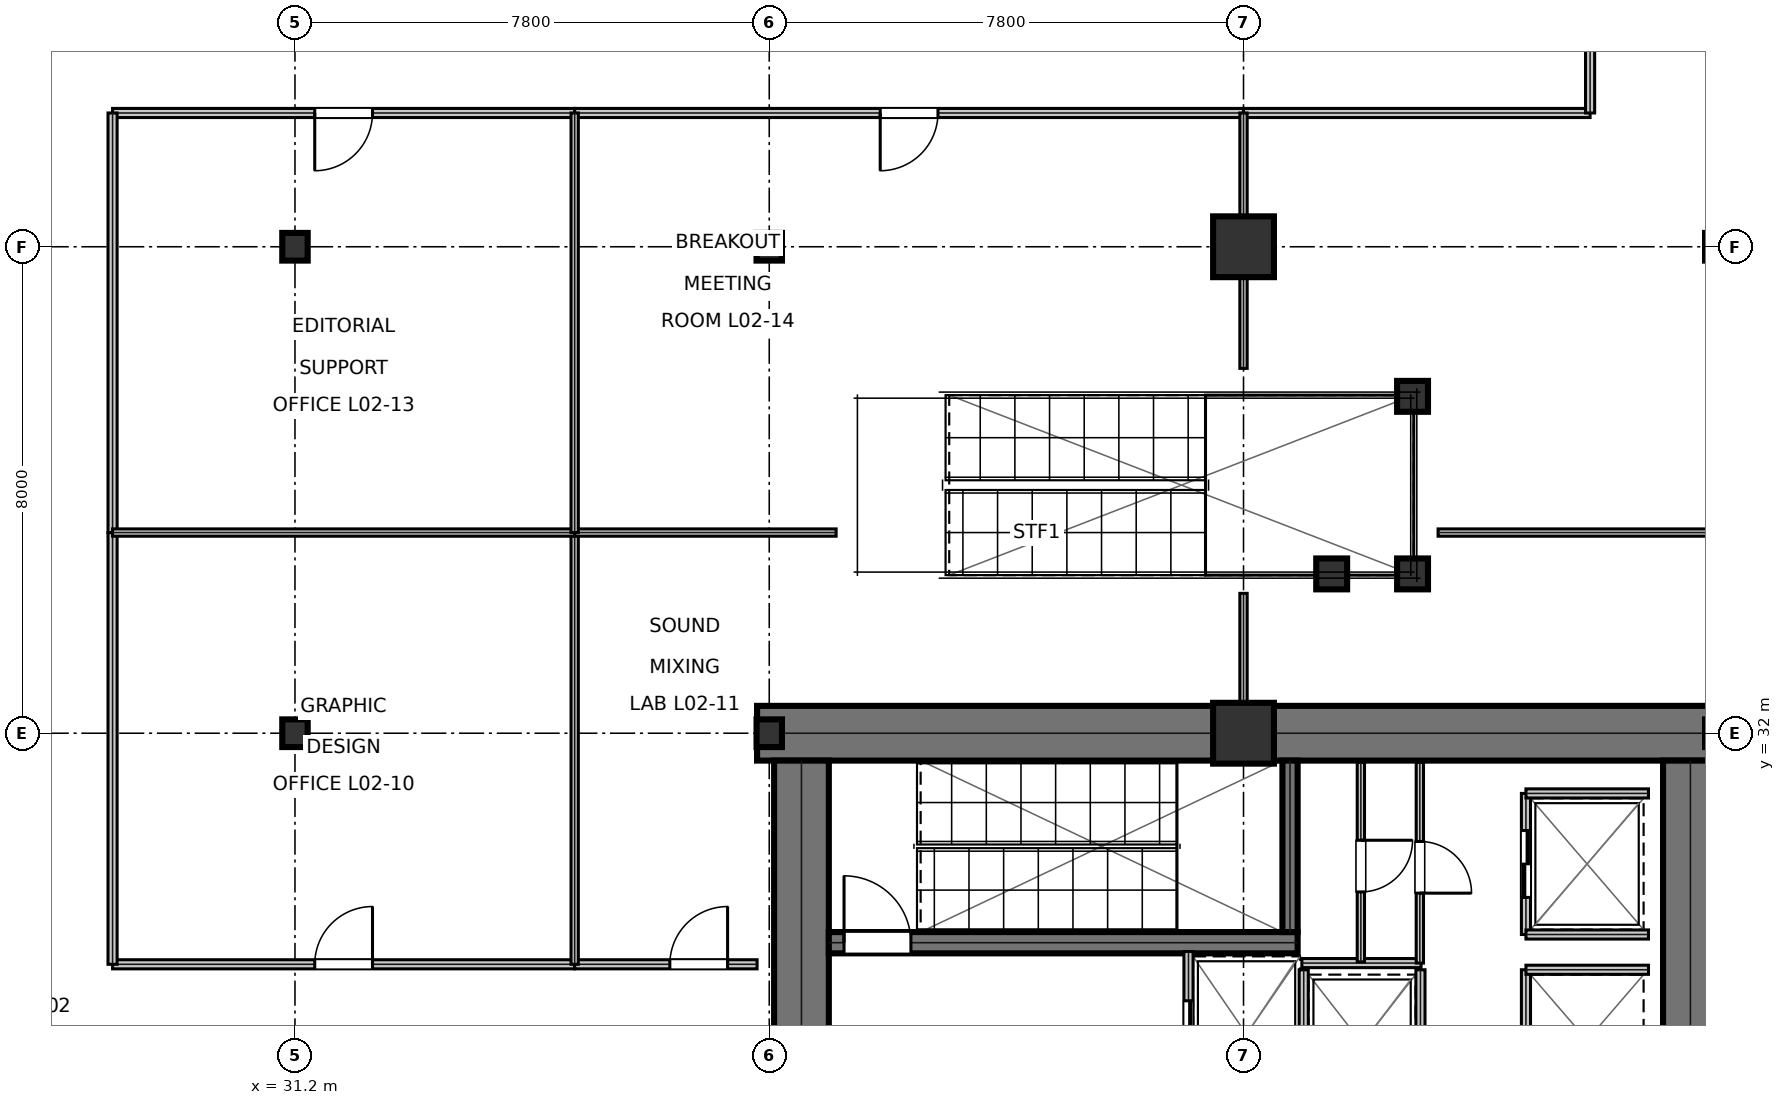
"""IFC4 building model, lengths in metres.
Left out: names, types, materials, properties, quantities, classifications, styles, units other than length and angle.
Written with IfcOpenShell. Run it as: python <this file> out.ifc"""

import sys

from ifc_helpers import new_model, si_unit, direction, frame, frame_2d, origin, origin_2d, place, context, subcontext, project, spatial, rectangle, hollow_circle, i_section, extrude, element, fill, save


model = new_model("IFC4")
c1 = context("Model", 3, precision=1e-05, world=origin(), true_north=direction((0.0, 1.0)))
c2 = subcontext(c1, "Body", "Model", "MODEL_VIEW")
j1 = project(units=[si_unit("LENGTHUNIT", "METRE"), si_unit("PLANEANGLEUNIT", "RADIAN")], contexts=[c1])
p1 = place(None, origin())
s1 = spatial("IfcSite", under=j1, at=p1, CompositionType="ELEMENT")
p2 = place(p1, origin())
s2 = spatial("IfcBuilding", under=s1, at=p2, CompositionType="ELEMENT")
p3 = place(p2, frame((0.0, 0.0, 10.8)))
s3 = spatial("IfcBuildingStorey", under=s2, at=p3, CompositionType="ELEMENT", Elevation=10.8)
p4 = place(p3, frame((38.8, 32.0, 0.0), z_axis=(0.0, 0.0, 1.0), x_axis=(1.0, 0.0, 0.0)))
e1 = element("IfcWall", 1, at=p4, inside=s3, PredefinedType="SHEAR", context=c2, shape_type="SweptSolid", body=[
    extrude(rectangle(XDim=16.0, YDim=0.9, at=frame_2d((8.0, 0.0))), origin(), (0.0, 0.0, 1.0), 5.12),
])
p5 = place(p3, frame((39.53, 25.4, 0.0), z_axis=(0.0, 0.0, 1.0), x_axis=(0.0, 1.0, 0.0)))
e2 = element("IfcWall", 2, at=p5, inside=s3, PredefinedType="SHEAR", context=c2, shape_type="SweptSolid", body=[
    extrude(rectangle(XDim=6.15, YDim=0.9, at=frame_2d((3.075, 0.0))), origin(), (0.0, 0.0, 1.0), 5.12),
])
p6 = place(p3, frame((54.15, 16.45, 0.0), z_axis=(0.0, 0.0, 1.0), x_axis=(0.0, 1.0, 0.0)))
e3 = element("IfcWall", 3, at=p6, inside=s3, PredefinedType="SHEAR", context=c2, shape_type="SweptSolid", body=[
    extrude(rectangle(XDim=15.1, YDim=0.9, at=frame_2d((7.55, 0.0))), origin(), (0.0, 0.0, 1.0), 5.12),
])
p7 = place(p3, frame((39.98, 28.555, 0.0), z_axis=(0.0, 0.0, 1.0), x_axis=(1.0, 0.0, 0.0)))
e4 = element("IfcWall", 4, at=p7, inside=s3, PredefinedType="SHEAR", context=c2, shape_type="SweptSolid", body=[
    extrude(rectangle(XDim=7.71, YDim=0.35, at=frame_2d((3.855, 0.0))), origin(), (0.0, 0.0, 1.0), 5.12),
])
p8 = place(p7, frame((0.25, 0.0, 0.0)))
e5 = element("IfcOpeningElement", 5, at=p8, cuts=e4, PredefinedType="OPENING", context=c2, shape_type="SweptSolid", body=[
    extrude(rectangle(XDim=1.1, YDim=2.15, at=frame_2d((0.55, 1.075))), frame((0.0, 0.185, 0.0), z_axis=(0.0, -1.0, 0.0), x_axis=(1.0, 0.0, 0.0)), (0.0, 0.0, 1.0), 0.37),
])
p9 = place(p3, frame((47.565, 28.73, 0.0), z_axis=(0.0, 0.0, 1.0), x_axis=(0.0, 1.0, 0.0)))
e6 = element("IfcWall", 6, at=p9, inside=s3, PredefinedType="SHEAR", context=c2, shape_type="SweptSolid", body=[
    extrude(rectangle(XDim=2.82, YDim=0.25, at=frame_2d((1.41, 0.0))), origin(), (0.0, 0.0, 1.0), 5.12),
])
for number, where, z_axis, x_axis in (
    (7, (31.2, 32.0, 0.0), (0.0, 0.0, 1.0), (1.0, 0.0, 0.0)),
    (8, (31.2, 40.0, 0.0), (0.0, 0.0, 1.0), (1.0, 0.0, 0.0)),
    (9, (39.0, 32.0, 0.0), (0.0, 0.0, 1.0), (1.0, 0.0, 0.0)),
    (10, (39.0, 40.0, 0.0), (0.0, 0.0, 1.0), (1.0, 0.0, 0.0)),
):
    element("IfcColumn", number, at=place(p3, frame(where, z_axis=z_axis, x_axis=x_axis)), inside=s3, PredefinedType="COLUMN", context=c2, shape_type="SweptSolid", body=[
        extrude(i_section(OverallWidth=0.418, OverallDepth=0.455, WebThickness=0.042, FlangeThickness=0.068, at=origin_2d()), origin(), (0.0, 0.0, 1.0), 5.395),
    ])
for number, where, z_axis, x_axis in (
    (11, (46.8, 32.0, 0.0), (0.0, 0.0, 1.0), (1.0, 0.0, 0.0)),
    (12, (46.8, 40.0, 0.0), (0.0, 0.0, 1.0), (1.0, 0.0, 0.0)),
):
    element("IfcColumn", number, at=place(p3, frame(where, z_axis=z_axis, x_axis=x_axis)), inside=s3, PredefinedType="COLUMN", context=c2, shape_type="SweptSolid", body=[
        extrude(rectangle(XDim=1.0, YDim=1.0, at=origin_2d()), origin(), (0.0, 0.0, 1.0), 5.395),
    ])
for number, where, z_axis, x_axis in (
    (13, (48.25, 34.62, 0.0), (0.0, 0.0, 1.0), (1.0, 0.0, 0.0)),
    (14, (49.58, 34.62, 0.0), (0.0, 0.0, 1.0), (1.0, 0.0, 0.0)),
    (15, (49.58, 37.54, 0.0), (0.0, 0.0, 1.0), (1.0, 0.0, 0.0)),
):
    element("IfcColumn", number, at=place(p3, frame(where, z_axis=z_axis, x_axis=x_axis)), inside=s3, PredefinedType="COLUMN", context=c2, shape_type="SweptSolid", body=[
        extrude(hollow_circle(Radius=0.254, WallThickness=0.02, at=origin_2d()), origin(), (0.0, 0.0, 1.0), 5.394),
    ])
p10 = place(p3, frame((45.895, 25.69, 0.0), z_axis=(0.0, 0.0, 1.0), x_axis=(0.0, 1.0, 0.0)))
e16 = element("IfcWall", 16, at=p10, inside=s3, PredefinedType="PARTITIONING", context=c2, shape_type="SweptSolid", body=[
    extrude(rectangle(XDim=2.72, YDim=0.15, at=frame_2d((1.36, 0.0))), origin(), (0.0, 0.0, 1.0), 5.12),
])
p11 = place(p10, frame((0.81, 0.0, 0.0)))
e17 = element("IfcOpeningElement", 17, at=p11, cuts=e16, PredefinedType="OPENING", context=c2, shape_type="SweptSolid", body=[
    extrude(rectangle(XDim=1.1, YDim=2.15, at=frame_2d((0.55, 1.075))), frame((0.0, 0.085, 0.0), z_axis=(0.0, -1.0, 0.0), x_axis=(1.0, 0.0, 0.0)), (0.0, 0.0, 1.0), 0.17),
])
for number, where, z_axis, x_axis in (
    (18, (47.79, 25.695, 0.0), (0.0, 0.0, 1.0), (0.0, 1.0, 0.0)),
    (19, (49.71, 25.695, 0.0), (0.0, 0.0, 1.0), (0.0, 1.0, 0.0)),
):
    element("IfcWall", number, at=place(p3, frame(where, z_axis=z_axis, x_axis=x_axis)), inside=s3, PredefinedType="PARTITIONING", context=c2, shape_type="SweptSolid", body=[
        extrude(rectangle(XDim=2.415, YDim=0.15, at=frame_2d((1.208, 0.0))), origin(), (0.0, 0.0, 1.0), 5.12),
    ])
p12 = place(p3, frame((51.445, 28.69, 0.0), z_axis=(0.0, 0.0, 1.0), x_axis=(0.0, 1.0, 0.0)))
e20 = element("IfcWall", 20, at=p12, inside=s3, PredefinedType="PARTITIONING", context=c2, shape_type="SweptSolid", body=[
    extrude(rectangle(XDim=2.32, YDim=0.15, at=frame_2d((1.16, 0.0))), origin(), (0.0, 0.0, 1.0), 5.12),
])
p13 = place(p12, frame((0.61, 0.0, 0.0)))
e21 = element("IfcOpeningElement", 21, at=p13, cuts=e20, PredefinedType="OPENING", context=c2, shape_type="SweptSolid", body=[
    extrude(rectangle(XDim=1.1, YDim=2.15, at=frame_2d((0.55, 1.075))), frame((0.0, 0.085, 0.0), z_axis=(0.0, -1.0, 0.0), x_axis=(1.0, 0.0, 0.0)), (0.0, 0.0, 1.0), 0.17),
])
for number, where, z_axis, x_axis in (
    (22, (51.445, 28.69, 0.0), (0.0, 0.0, 1.0), (1.0, 0.0, 0.0)),
    (23, (51.445, 31.01, 0.0), (0.0, 0.0, 1.0), (1.0, 0.0, 0.0)),
):
    element("IfcWall", number, at=place(p3, frame(where, z_axis=z_axis, x_axis=x_axis)), inside=s3, PredefinedType="PARTITIONING", context=c2, shape_type="SweptSolid", body=[
        extrude(rectangle(XDim=2.015, YDim=0.15, at=frame_2d((1.007, 0.0))), origin(), (0.0, 0.0, 1.0), 5.12),
    ])
p14 = place(p3, frame((51.445, 25.79, 0.0), z_axis=(0.0, 0.0, 1.0), x_axis=(0.0, 1.0, 0.0)))
e24 = element("IfcWall", 24, at=p14, inside=s3, PredefinedType="PARTITIONING", context=c2, shape_type="SweptSolid", body=[
    extrude(rectangle(XDim=2.32, YDim=0.15, at=frame_2d((1.16, 0.0))), origin(), (0.0, 0.0, 1.0), 5.12),
])
p15 = place(p3, frame((51.445, 28.11, 0.0), z_axis=(0.0, 0.0, 1.0), x_axis=(1.0, 0.0, 0.0)))
e25 = element("IfcWall", 25, at=p15, inside=s3, PredefinedType="PARTITIONING", context=c2, shape_type="SweptSolid", body=[
    extrude(rectangle(XDim=2.015, YDim=0.15, at=frame_2d((1.007, 0.0))), origin(), (0.0, 0.0, 1.0), 5.12),
])
p16 = place(p3, frame((47.76, 28.22, 0.0), z_axis=(0.0, 0.0, 1.0), x_axis=(1.0, 0.0, 0.0)))
e26 = element("IfcWall", 26, at=p16, inside=s3, PredefinedType="PARTITIONING", context=c2, shape_type="SweptSolid", body=[
    extrude(rectangle(XDim=1.96, YDim=0.15, at=frame_2d((0.98, 0.0))), origin(), (0.0, 0.0, 1.0), 5.12),
])
p17 = place(p3, frame((48.73, 28.24, 0.0), z_axis=(0.0, 0.0, 1.0), x_axis=(0.0, 1.0, 0.0)))
e27 = element("IfcWall", 27, at=p17, inside=s3, PredefinedType="PARTITIONING", context=c2, shape_type="SweptSolid", body=[
    extrude(rectangle(XDim=3.28, YDim=0.12, at=frame_2d((1.64, 0.0))), origin(), (0.0, 0.0, 1.0), 5.12),
])
p18 = place(p17, frame((1.15, 0.0, 0.0)))
e28 = element("IfcOpeningElement", 28, at=p18, cuts=e27, PredefinedType="OPENING", context=c2, shape_type="SweptSolid", body=[
    extrude(rectangle(XDim=0.85, YDim=2.15, at=frame_2d((0.425, 1.075))), frame((0.0, 0.07, 0.0), z_axis=(0.0, -1.0, 0.0), x_axis=(1.0, 0.0, 0.0)), (0.0, 0.0, 1.0), 0.14),
])
p19 = place(p3, frame((49.7, 28.22, 0.0), z_axis=(0.0, 0.0, 1.0), x_axis=(0.0, 1.0, 0.0)))
e29 = element("IfcWall", 29, at=p19, inside=s3, PredefinedType="PARTITIONING", context=c2, shape_type="SweptSolid", body=[
    extrude(rectangle(XDim=3.3, YDim=0.12, at=frame_2d((1.65, 0.0))), origin(), (0.0, 0.0, 1.0), 5.12),
])
p20 = place(p19, frame((1.15, 0.0, 0.0)))
e30 = element("IfcOpeningElement", 30, at=p20, cuts=e29, PredefinedType="OPENING", context=c2, shape_type="SweptSolid", body=[
    extrude(rectangle(XDim=0.85, YDim=2.15, at=frame_2d((0.425, 1.075))), frame((0.0, 0.07, 0.0), z_axis=(0.0, -1.0, 0.0), x_axis=(1.0, 0.0, 0.0)), (0.0, 0.0, 1.0), 0.14),
])
p21 = place(p3, frame((28.2, 28.2, 0.0), z_axis=(0.0, 0.0, 1.0), x_axis=(1.0, 0.0, 0.0)))
e31 = element("IfcWall", 31, at=p21, inside=s3, PredefinedType="PARTITIONING", context=c2, shape_type="SweptSolid", body=[
    extrude(rectangle(XDim=7.6, YDim=0.15, at=frame_2d((3.8, 0.0))), origin(), (0.0, 0.0, 1.0), 4.415),
])
p22 = place(p21, frame((3.325, 0.0, 0.0)))
e32 = element("IfcOpeningElement", 32, at=p22, cuts=e31, PredefinedType="OPENING", context=c2, shape_type="SweptSolid", body=[
    extrude(rectangle(XDim=0.95, YDim=2.15, at=frame_2d((0.475, 1.075))), frame((0.0, 0.085, 0.0), z_axis=(0.0, -1.0, 0.0), x_axis=(1.0, 0.0, 0.0)), (0.0, 0.0, 1.0), 0.17),
])
p23 = place(p3, frame((35.8, 28.2, 0.0), z_axis=(0.0, 0.0, 1.0), x_axis=(1.0, 0.0, 0.0)))
e33 = element("IfcWall", 33, at=p23, inside=s3, PredefinedType="PARTITIONING", context=c2, shape_type="SweptSolid", body=[
    extrude(rectangle(XDim=3.0, YDim=0.15, at=frame_2d((1.5, 0.0))), origin(), (0.0, 0.0, 1.0), 5.12),
])
p24 = place(p23, frame((1.565, 0.0, 0.0)))
e34 = element("IfcOpeningElement", 34, at=p24, cuts=e33, PredefinedType="OPENING", context=c2, shape_type="SweptSolid", body=[
    extrude(rectangle(XDim=0.95, YDim=2.15, at=frame_2d((0.475, 1.075))), frame((0.0, 0.085, 0.0), z_axis=(0.0, -1.0, 0.0), x_axis=(1.0, 0.0, 0.0)), (0.0, 0.0, 1.0), 0.17),
])
p25 = place(p3, frame((28.2, 42.2, 0.0), z_axis=(0.0, 0.0, 1.0), x_axis=(1.0, 0.0, 0.0)))
e35 = element("IfcWall", 35, at=p25, inside=s3, PredefinedType="PARTITIONING", context=c2, shape_type="SweptSolid", body=[
    extrude(rectangle(XDim=7.6, YDim=0.15, at=frame_2d((3.8, 0.0))), origin(), (0.0, 0.0, 1.0), 4.415),
])
p26 = place(p25, frame((3.325, 0.0, 0.0)))
e36 = element("IfcOpeningElement", 36, at=p26, cuts=e35, PredefinedType="OPENING", context=c2, shape_type="SweptSolid", body=[
    extrude(rectangle(XDim=0.95, YDim=2.15, at=frame_2d((0.475, 1.075))), frame((0.0, 0.085, 0.0), z_axis=(0.0, -1.0, 0.0), x_axis=(1.0, 0.0, 0.0)), (0.0, 0.0, 1.0), 0.17),
])
p27 = place(p3, frame((35.8, 42.2, 0.0), z_axis=(0.0, 0.0, 1.0), x_axis=(1.0, 0.0, 0.0)))
e37 = element("IfcWall", 37, at=p27, inside=s3, PredefinedType="PARTITIONING", context=c2, shape_type="SweptSolid", body=[
    extrude(rectangle(XDim=11.0, YDim=0.15, at=frame_2d((5.5, 0.0))), origin(), (0.0, 0.0, 1.0), 4.415),
])
p28 = place(p27, frame((5.025, 0.0, 0.0)))
e38 = element("IfcOpeningElement", 38, at=p28, cuts=e37, PredefinedType="OPENING", context=c2, shape_type="SweptSolid", body=[
    extrude(rectangle(XDim=0.95, YDim=2.15, at=frame_2d((0.475, 1.075))), frame((0.0, 0.085, 0.0), z_axis=(0.0, -1.0, 0.0), x_axis=(1.0, 0.0, 0.0)), (0.0, 0.0, 1.0), 0.17),
])
p29 = place(p3, frame((28.2, 28.2, 0.0), z_axis=(0.0, 0.0, 1.0), x_axis=(0.0, 1.0, 0.0)))
e39 = element("IfcWall", 39, at=p29, inside=s3, PredefinedType="PARTITIONING", context=c2, shape_type="SweptSolid", body=[
    extrude(rectangle(XDim=7.1, YDim=0.15, at=frame_2d((3.55, 0.0))), origin(), (0.0, 0.0, 1.0), 4.338),
])
p30 = place(p3, frame((28.2, 35.3, 0.0), z_axis=(0.0, 0.0, 1.0), x_axis=(0.0, 1.0, 0.0)))
e40 = element("IfcWall", 40, at=p30, inside=s3, PredefinedType="PARTITIONING", context=c2, shape_type="SweptSolid", body=[
    extrude(rectangle(XDim=6.9, YDim=0.15, at=frame_2d((3.45, 0.0))), origin(), (0.0, 0.0, 1.0), 4.338),
])
p31 = place(p3, frame((46.8, 42.2, 0.0), z_axis=(0.0, 0.0, 1.0), x_axis=(1.0, 0.0, 0.0)))
e41 = element("IfcWall", 41, at=p31, inside=s3, PredefinedType="PARTITIONING", context=c2, shape_type="SweptSolid", body=[
    extrude(rectangle(XDim=5.7, YDim=0.15, at=frame_2d((2.85, 0.0))), origin(), (0.0, 0.0, 1.0), 4.415),
])
p32 = place(p3, frame((52.5, 42.2, 0.0), z_axis=(0.0, 0.0, 1.0), x_axis=(0.0, 1.0, 0.0)))
e42 = element("IfcWall", 42, at=p32, inside=s3, PredefinedType="PARTITIONING", context=c2, shape_type="SweptSolid", body=[
    extrude(rectangle(XDim=2.0, YDim=0.15, at=frame_2d((1.0, 0.0))), origin(), (0.0, 0.0, 1.0), 4.701),
])
p33 = place(p3, frame((46.8, 32.4, 0.0), z_axis=(0.0, 0.0, 1.0), x_axis=(0.0, 1.0, 0.0)))
e43 = element("IfcWall", 43, at=p33, inside=s3, PredefinedType="PARTITIONING", context=c2, shape_type="SweptSolid", body=[
    extrude(rectangle(XDim=1.9, YDim=0.12, at=frame_2d((0.95, 0.0))), origin(), (0.0, 0.0, 1.0), 5.12),
])
p34 = place(p3, frame((50.0, 35.3, 0.0), z_axis=(0.0, 0.0, 1.0), x_axis=(1.0, 0.0, 0.0)))
e44 = element("IfcWall", 44, at=p34, inside=s3, PredefinedType="PARTITIONING", context=c2, shape_type="SweptSolid", body=[
    extrude(rectangle(XDim=12.4, YDim=0.12, at=frame_2d((6.2, 0.0))), origin(), (0.0, 0.0, 1.0), 4.415),
])
p35 = place(p3, frame((35.8, 28.2, 0.0), z_axis=(0.0, 0.0, 1.0), x_axis=(0.0, 1.0, 0.0)))
e45 = element("IfcWall", 45, at=p35, inside=s3, PredefinedType="PARTITIONING", context=c2, shape_type="SweptSolid", body=[
    extrude(rectangle(XDim=7.1, YDim=0.12, at=frame_2d((3.55, 0.0))), origin(), (0.0, 0.0, 1.0), 4.338),
])
p36 = place(p3, frame((28.2, 35.3, 0.0), z_axis=(0.0, 0.0, 1.0), x_axis=(1.0, 0.0, 0.0)))
e46 = element("IfcWall", 46, at=p36, inside=s3, PredefinedType="PARTITIONING", context=c2, shape_type="SweptSolid", body=[
    extrude(rectangle(XDim=7.6, YDim=0.12, at=frame_2d((3.8, 0.0))), origin(), (0.0, 0.0, 1.0), 4.415),
])
p37 = place(p3, frame((35.8, 35.3, 0.0), z_axis=(0.0, 0.0, 1.0), x_axis=(1.0, 0.0, 0.0)))
e47 = element("IfcWall", 47, at=p37, inside=s3, PredefinedType="PARTITIONING", context=c2, shape_type="SweptSolid", body=[
    extrude(rectangle(XDim=4.3, YDim=0.12, at=frame_2d((2.15, 0.0))), origin(), (0.0, 0.0, 1.0), 4.415),
])
p38 = place(p3, frame((35.8, 35.3, 0.0), z_axis=(0.0, 0.0, 1.0), x_axis=(0.0, 1.0, 0.0)))
e48 = element("IfcWall", 48, at=p38, inside=s3, PredefinedType="PARTITIONING", context=c2, shape_type="SweptSolid", body=[
    extrude(rectangle(XDim=6.9, YDim=0.12, at=frame_2d((3.45, 0.0))), origin(), (0.0, 0.0, 1.0), 4.338),
])
p39 = place(p3, frame((46.8, 38.0, 0.0), z_axis=(0.0, 0.0, 1.0), x_axis=(0.0, 1.0, 0.0)))
e49 = element("IfcWall", 49, at=p39, inside=s3, PredefinedType="PARTITIONING", context=c2, shape_type="SweptSolid", body=[
    extrude(rectangle(XDim=4.2, YDim=0.12, at=frame_2d((2.1, 0.0))), origin(), (0.0, 0.0, 1.0), 4.338),
])
p40 = place(p11, frame((1.1, 0.0, 0.0), z_axis=(0.0, 0.0, 1.0), x_axis=(-1.0, 0.0, 0.0)))
e50 = element("IfcDoor", 50, at=p40, inside=s3, OperationType="DOUBLE_DOOR_SLIDING", PredefinedType="DOOR", context=c2, shape_type="SweptSolid", body=[
    extrude(rectangle(XDim=1.1, YDim=2.15, at=frame_2d((0.55, 1.075))), frame((0.0, 0.025, 0.0), z_axis=(0.0, -1.0, 0.0), x_axis=(1.0, 0.0, 0.0)), (0.0, 0.0, 1.0), 0.05),
])
fill(e17, e50)
p41 = place(p13, frame((1.1, 0.0, 0.0), z_axis=(0.0, 0.0, 1.0), x_axis=(-1.0, 0.0, 0.0)))
e51 = element("IfcDoor", 51, at=p41, inside=s3, OperationType="DOUBLE_DOOR_SLIDING", PredefinedType="DOOR", context=c2, shape_type="SweptSolid", body=[
    extrude(rectangle(XDim=1.1, YDim=2.15, at=frame_2d((0.55, 1.075))), frame((0.0, 0.025, 0.0), z_axis=(0.0, -1.0, 0.0), x_axis=(1.0, 0.0, 0.0)), (0.0, 0.0, 1.0), 0.05),
])
fill(e21, e51)
p42 = place(p18, frame((0.85, 0.0, 0.0), z_axis=(0.0, 0.0, 1.0), x_axis=(-1.0, 0.0, 0.0)))
e52 = element("IfcDoor", 52, at=p42, inside=s3, OperationType="SINGLE_SWING_LEFT", PredefinedType="DOOR", context=c2, shape_type="SweptSolid", body=[
    extrude(rectangle(XDim=0.85, YDim=2.15, at=frame_2d((0.425, 1.075))), frame((0.0, 0.025, 0.0), z_axis=(0.0, -1.0, 0.0), x_axis=(1.0, 0.0, 0.0)), (0.0, 0.0, 1.0), 0.05),
])
fill(e28, e52)
p43 = place(p20, frame((0.85, 0.0, 0.0), z_axis=(0.0, 0.0, 1.0), x_axis=(-1.0, 0.0, 0.0)))
e53 = element("IfcDoor", 53, at=p43, inside=s3, OperationType="SINGLE_SWING_RIGHT", PredefinedType="DOOR", context=c2, shape_type="SweptSolid", body=[
    extrude(rectangle(XDim=0.85, YDim=2.15, at=frame_2d((0.425, 1.075))), frame((0.0, 0.025, 0.0), z_axis=(0.0, -1.0, 0.0), x_axis=(1.0, 0.0, 0.0)), (0.0, 0.0, 1.0), 0.05),
])
fill(e30, e53)
p44 = place(p22, origin())
e54 = element("IfcDoor", 54, at=p44, inside=s3, OperationType="SINGLE_SWING_RIGHT", PredefinedType="DOOR", context=c2, shape_type="SweptSolid", body=[
    extrude(rectangle(XDim=0.95, YDim=2.15, at=frame_2d((0.475, 1.075))), frame((0.0, 0.025, 0.0), z_axis=(0.0, -1.0, 0.0), x_axis=(1.0, 0.0, 0.0)), (0.0, 0.0, 1.0), 0.05),
])
fill(e32, e54)
p45 = place(p24, origin())
e55 = element("IfcDoor", 55, at=p45, inside=s3, OperationType="SINGLE_SWING_RIGHT", PredefinedType="DOOR", context=c2, shape_type="SweptSolid", body=[
    extrude(rectangle(XDim=0.95, YDim=2.15, at=frame_2d((0.475, 1.075))), frame((0.0, 0.025, 0.0), z_axis=(0.0, -1.0, 0.0), x_axis=(1.0, 0.0, 0.0)), (0.0, 0.0, 1.0), 0.05),
])
fill(e34, e55)
p46 = place(p26, frame((0.95, 0.0, 0.0), z_axis=(0.0, 0.0, 1.0), x_axis=(-1.0, 0.0, 0.0)))
e56 = element("IfcDoor", 56, at=p46, inside=s3, OperationType="SINGLE_SWING_RIGHT", PredefinedType="DOOR", context=c2, shape_type="SweptSolid", body=[
    extrude(rectangle(XDim=0.95, YDim=2.15, at=frame_2d((0.475, 1.075))), frame((0.0, 0.025, 0.0), z_axis=(0.0, -1.0, 0.0), x_axis=(1.0, 0.0, 0.0)), (0.0, 0.0, 1.0), 0.05),
])
fill(e36, e56)
p47 = place(p28, frame((0.95, 0.0, 0.0), z_axis=(0.0, 0.0, 1.0), x_axis=(-1.0, 0.0, 0.0)))
e57 = element("IfcDoor", 57, at=p47, inside=s3, OperationType="SINGLE_SWING_RIGHT", PredefinedType="DOOR", context=c2, shape_type="SweptSolid", body=[
    extrude(rectangle(XDim=0.95, YDim=2.15, at=frame_2d((0.475, 1.075))), frame((0.0, 0.025, 0.0), z_axis=(0.0, -1.0, 0.0), x_axis=(1.0, 0.0, 0.0)), (0.0, 0.0, 1.0), 0.05),
])
fill(e38, e57)
p48 = place(p8, origin())
e58 = element("IfcDoor", 58, at=p48, inside=s3, OperationType="SINGLE_SWING_LEFT", PredefinedType="DOOR", context=c2, shape_type="SweptSolid", body=[
    extrude(rectangle(XDim=1.1, YDim=2.15, at=frame_2d((0.55, 1.075))), frame((0.0, 0.025, 0.0), z_axis=(0.0, -1.0, 0.0), x_axis=(1.0, 0.0, 0.0)), (0.0, 0.0, 1.0), 0.05),
])
fill(e5, e58)
save(model, sys.argv[1])
